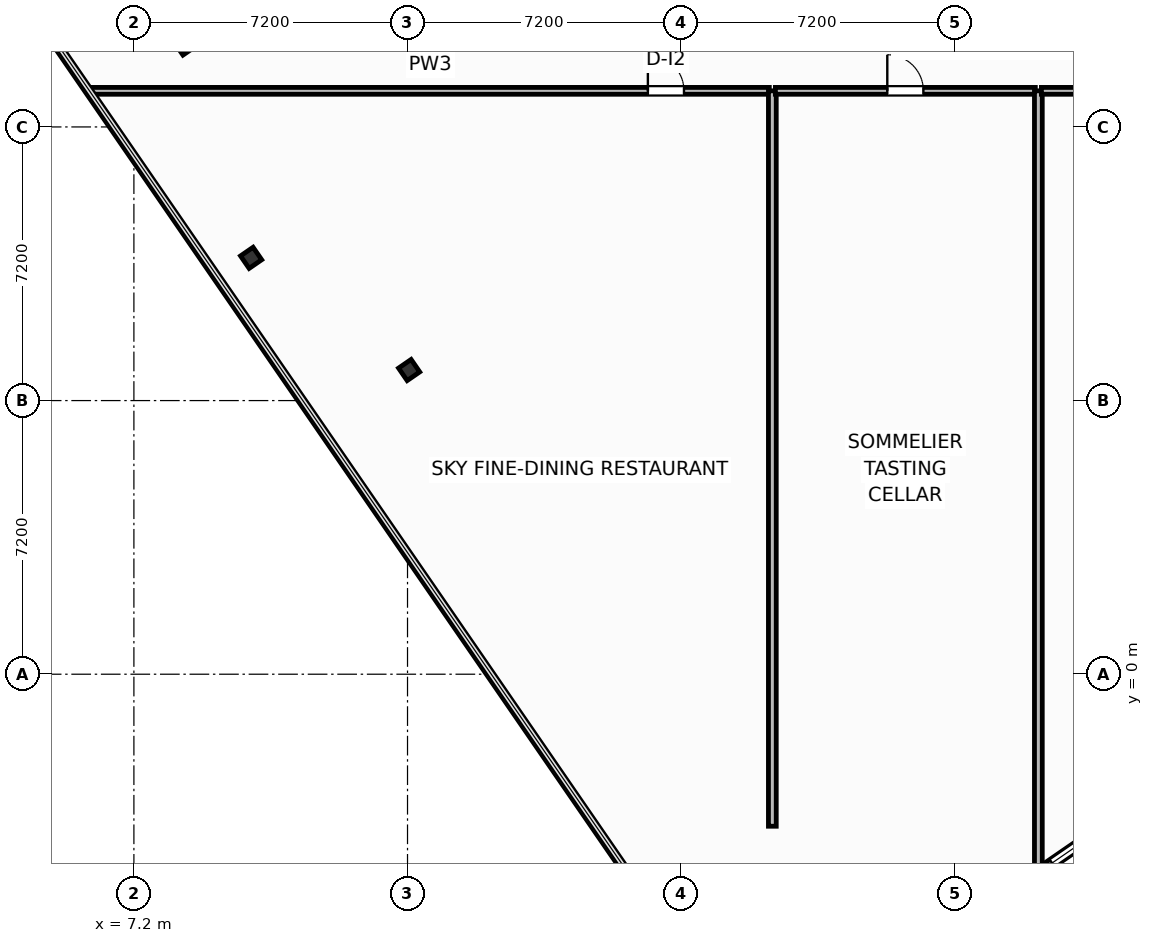
"""IFC4 building model, lengths in metres.
Left out: names, types, materials, properties, quantities, classifications, styles, units other than length and angle.
Written with IfcOpenShell. Run it as: python <this file> out.ifc"""

import sys

from ifc_helpers import new_model, si_unit, direction, frame, frame_2d, origin, origin_2d, place, context, subcontext, project, spatial, rectangle, i_section, extrude, element, fill, save


model = new_model("IFC4")
c1 = context("Model", 3, precision=1e-05, world=origin(), true_north=direction((0.0, 1.0)))
c2 = subcontext(c1, "Body", "Model", "MODEL_VIEW")
j1 = project(units=[si_unit("LENGTHUNIT", "METRE"), si_unit("PLANEANGLEUNIT", "RADIAN")], contexts=[c1])
p1 = place(None, origin())
s1 = spatial("IfcSite", under=j1, at=p1, CompositionType="ELEMENT")
p2 = place(p1, origin())
s2 = spatial("IfcBuilding", under=s1, at=p2, CompositionType="ELEMENT")
p3 = place(p2, frame((0.0, 0.0, 265.6)))
s3 = spatial("IfcBuildingStorey", under=s2, at=p3, CompositionType="ELEMENT", Elevation=265.6)
for number, where, z_axis, x_axis in (
    (1, (8.543, 16.569, 0.0), (0.0, 0.0, 1.0), (0.824, 0.567, 0.0)),
    (2, (10.284, 10.956, 0.0), (0.0, 0.0, 1.0), (0.824, 0.567, 0.0)),
    (3, (14.443, 8.004, 0.0), (0.0, 0.0, 1.0), (0.824, 0.567, 0.0)),
):
    element("IfcColumn", number, at=place(p3, frame(where, z_axis=z_axis, x_axis=x_axis)), inside=s3, PredefinedType="COLUMN", context=c2, shape_type="SweptSolid", body=[
        extrude(i_section(OverallWidth=0.401, OverallDepth=0.399, WebThickness=0.025, FlangeThickness=0.04, FilletRadius=0.022, at=origin_2d()), origin(), (0.0, 0.0, 1.0), 3.7),
    ])
p4 = place(p3, frame((27.704, -7.488, 0.0), z_axis=(0.0, 0.0, 1.0), x_axis=(0.823529068157, 0.567274073003, 0.0)))
e4 = element("IfcWall", 4, at=p4, inside=s3, PredefinedType="SOLIDWALL", context=c2, shape_type="SweptSolid", body=[
    extrude(rectangle(XDim=10.98, YDim=0.22, at=frame_2d((5.49, 0.0))), origin(), (0.0, 0.0, 1.0), 2.73),
])
p5 = place(p4, frame((4.44, 0.0, 0.8)))
e5 = element("IfcOpeningElement", 5, at=p5, cuts=e4, PredefinedType="OPENING", context=c2, shape_type="SweptSolid", body=[
    extrude(rectangle(XDim=2.1, YDim=1.75, at=frame_2d((1.05, 0.875))), frame((0.0, 0.12, 0.0), z_axis=(0.0, -1.0, 0.0), x_axis=(1.0, 0.0, 0.0)), (0.0, 0.0, 1.0), 0.24),
])
p6 = place(p3, frame((6.071, 15.35, 0.0), z_axis=(0.0, 0.0, 1.0), x_axis=(1.0, 0.0, 0.0)))
e6 = element("IfcWall", 6, at=p6, inside=s3, PredefinedType="PARTITIONING", context=c2, shape_type="SweptSolid", body=[
    extrude(rectangle(XDim=17.849, YDim=0.18, at=frame_2d((8.924, 0.0))), origin(), (0.0, 0.0, 1.0), 3.45),
])
p7 = place(p6, frame((14.654, 0.0, 0.0)))
e7 = element("IfcOpeningElement", 7, at=p7, cuts=e6, PredefinedType="OPENING", context=c2, shape_type="SweptSolid", body=[
    extrude(rectangle(XDim=0.95, YDim=2.05, at=frame_2d((0.475, 1.025))), frame((0.0, 0.1, 0.0), z_axis=(0.0, -1.0, 0.0), x_axis=(1.0, 0.0, 0.0)), (0.0, 0.0, 1.0), 0.2),
])
p8 = place(p3, frame((24.0, -4.0, 0.0), z_axis=(0.0, 0.0, 1.0), x_axis=(0.0, 1.0, 0.0)))
e8 = element("IfcWall", 8, at=p8, inside=s3, PredefinedType="PARTITIONING", context=c2, shape_type="SweptSolid", body=[
    extrude(rectangle(XDim=19.35, YDim=0.205, at=frame_2d((9.675, 0.0))), origin(), (0.0, 0.0, 1.0), 3.45),
])
p9 = place(p3, frame((24.08, 15.35, 0.0), z_axis=(0.0, 0.0, 1.0), x_axis=(1.0, 0.0, 0.0)))
e9 = element("IfcWall", 9, at=p9, inside=s3, PredefinedType="PARTITIONING", context=c2, shape_type="SweptSolid", body=[
    extrude(rectangle(XDim=6.84, YDim=0.18, at=frame_2d((3.42, 0.0))), origin(), (0.0, 0.0, 1.0), 3.45),
])
p10 = place(p9, frame((2.945, 0.0, 0.0)))
e10 = element("IfcOpeningElement", 10, at=p10, cuts=e9, PredefinedType="OPENING", context=c2, shape_type="SweptSolid", body=[
    extrude(rectangle(XDim=0.95, YDim=2.05, at=frame_2d((0.475, 1.025))), frame((0.0, 0.1, 0.0), z_axis=(0.0, -1.0, 0.0), x_axis=(1.0, 0.0, 0.0)), (0.0, 0.0, 1.0), 0.2),
])
p11 = place(p3, frame((31.0, -5.112, 0.0), z_axis=(0.0, 0.0, 1.0), x_axis=(0.0, 1.0, 0.0)))
e11 = element("IfcWall", 11, at=p11, inside=s3, PredefinedType="PARTITIONING", context=c2, shape_type="SweptSolid", body=[
    extrude(rectangle(XDim=20.462, YDim=0.205, at=frame_2d((10.231, 0.0))), origin(), (0.0, 0.0, 1.0), 3.45),
])
p12 = place(p3, frame((31.08, 15.35, 0.0), z_axis=(0.0, 0.0, 1.0), x_axis=(1.0, 0.0, 0.0)))
e12 = element("IfcWall", 12, at=p12, inside=s3, PredefinedType="PARTITIONING", context=c2, shape_type="SweptSolid", body=[
    extrude(rectangle(XDim=6.84, YDim=0.18, at=frame_2d((3.42, 0.0))), origin(), (0.0, 0.0, 1.0), 3.45),
])
p13 = place(p12, frame((2.945, 0.0, 0.0)))
e13 = element("IfcOpeningElement", 13, at=p13, cuts=e12, PredefinedType="OPENING", context=c2, shape_type="SweptSolid", body=[
    extrude(rectangle(XDim=0.95, YDim=2.05, at=frame_2d((0.475, 1.025))), frame((0.0, 0.1, 0.0), z_axis=(0.0, -1.0, 0.0), x_axis=(1.0, 0.0, 0.0)), (0.0, 0.0, 1.0), 0.2),
])
p14 = place(p5, origin())
e14 = element("IfcWindow", 14, at=p14, inside=s3, PartitioningType="SINGLE_PANEL", PredefinedType="WINDOW", context=c2, shape_type="SweptSolid", body=[
    extrude(rectangle(XDim=2.1, YDim=1.75, at=frame_2d((1.05, 0.875))), frame((0.0, 0.03, 0.0), z_axis=(0.0, -1.0, 0.0), x_axis=(1.0, 0.0, 0.0)), (0.0, 0.0, 1.0), 0.06),
])
fill(e5, e14)
p15 = place(p7, origin())
e15 = element("IfcDoor", 15, at=p15, inside=s3, OperationType="SINGLE_SWING_LEFT", PredefinedType="DOOR", context=c2, shape_type="SweptSolid", body=[
    extrude(rectangle(XDim=0.95, YDim=2.05, at=frame_2d((0.475, 1.025))), frame((0.0, 0.025, 0.0), z_axis=(0.0, -1.0, 0.0), x_axis=(1.0, 0.0, 0.0)), (0.0, 0.0, 1.0), 0.05),
])
fill(e7, e15)
p16 = place(p10, origin())
e16 = element("IfcDoor", 16, at=p16, inside=s3, OperationType="SINGLE_SWING_LEFT", PredefinedType="DOOR", context=c2, shape_type="SweptSolid", body=[
    extrude(rectangle(XDim=0.95, YDim=2.05, at=frame_2d((0.475, 1.025))), frame((0.0, 0.025, 0.0), z_axis=(0.0, -1.0, 0.0), x_axis=(1.0, 0.0, 0.0)), (0.0, 0.0, 1.0), 0.05),
])
fill(e10, e16)
save(model, sys.argv[1])
